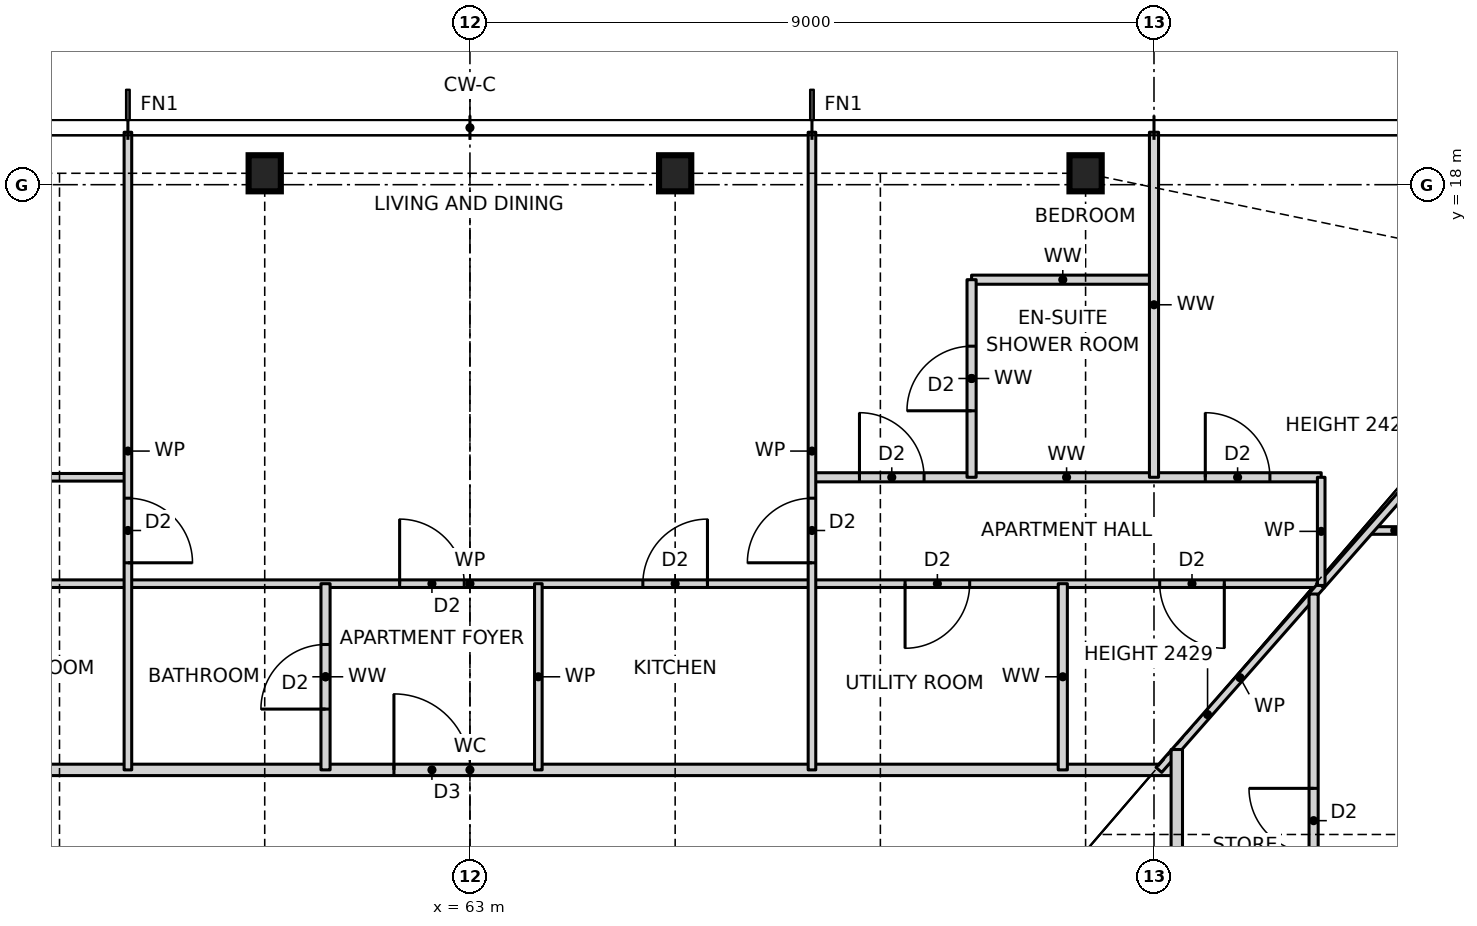
"""IFC4 building model, lengths in metres.
Left out: names, types, materials, properties, quantities, classifications, styles, units other than length and angle.
Written with IfcOpenShell. Run it as: python <this file> out.ifc"""

import sys

from ifc_helpers import new_model, si_unit, direction, frame, frame_2d, origin, origin_2d, place, context, subcontext, project, spatial, rectangle, i_section, extrude, element, fill, save


model = new_model("IFC4")
c1 = context("Model", 3, precision=1e-05, world=origin(), true_north=direction((0.0, 1.0)))
c2 = subcontext(c1, "Body", "Model", "MODEL_VIEW")
j1 = project(units=[si_unit("LENGTHUNIT", "METRE"), si_unit("PLANEANGLEUNIT", "RADIAN")], contexts=[c1])
p1 = place(None, origin())
s1 = spatial("IfcSite", under=j1, at=p1, CompositionType="ELEMENT")
p2 = place(p1, origin())
s2 = spatial("IfcBuilding", under=s1, at=p2, CompositionType="ELEMENT")
p3 = place(p2, frame((0.0, 0.0, 22.0)))
s3 = spatial("IfcBuildingStorey", under=s2, at=p3, CompositionType="ELEMENT", Elevation=22.0)
for number, where, z_axis, x_axis in (
    (1, (71.1, 18.15, 0.0), (0.0, 0.0, 1.0), (1.0, 0.0, 0.0)),
    (2, (65.7, 18.15, 0.0), (0.0, 0.0, 1.0), (1.0, 0.0, 0.0)),
    (3, (60.3, 18.15, 0.0), (0.0, 0.0, 1.0), (1.0, 0.0, 0.0)),
):
    element("IfcColumn", number, at=place(p3, frame(where, z_axis=z_axis, x_axis=x_axis)), inside=s3, PredefinedType="COLUMN", context=c2, shape_type="SweptSolid", body=[
        extrude(i_section(OverallWidth=0.424, OverallDepth=0.475, WebThickness=0.048, FlangeThickness=0.077, at=origin_2d()), origin(), (0.0, 0.0, 1.0), 3.5),
    ])
p4 = place(p3, frame((53.7, 10.3, 0.0), z_axis=(0.0, 0.0, 1.0), x_axis=(1.0, 0.0, 0.0)))
e4 = element("IfcWall", 4, at=p4, inside=s3, PredefinedType="PARTITIONING", context=c2, shape_type="SweptSolid", body=[
    extrude(rectangle(XDim=18.6, YDim=0.15, at=frame_2d((9.3, 0.0))), origin(), (0.0, 0.0, 1.0), 3.27),
])
p5 = place(p4, frame((8.3, 0.0, 0.0)))
e5 = element("IfcOpeningElement", 5, at=p5, cuts=e4, PredefinedType="OPENING", context=c2, shape_type="SweptSolid", body=[
    extrude(rectangle(XDim=1.0, YDim=2.1, at=frame_2d((0.5, 1.05))), frame((0.0, 0.085, 0.0), z_axis=(0.0, -1.0, 0.0), x_axis=(1.0, 0.0, 0.0)), (0.0, 0.0, 1.0), 0.17),
])
p6 = place(p3, frame((51.8, 12.75, 0.0), z_axis=(0.0, 0.0, 1.0), x_axis=(1.0, 0.0, 0.0)))
e6 = element("IfcWall", 6, at=p6, inside=s3, PredefinedType="PARTITIONING", context=c2, shape_type="SweptSolid", body=[
    extrude(rectangle(XDim=22.4, YDim=0.1, at=frame_2d((11.2, 0.0))), origin(), (0.0, 0.0, 1.0), 3.27),
])
p7 = place(p6, frame((13.475, 0.0, 0.0)))
e7 = element("IfcOpeningElement", 7, at=p7, cuts=e6, PredefinedType="OPENING", context=c2, shape_type="SweptSolid", body=[
    extrude(rectangle(XDim=0.85, YDim=2.1, at=frame_2d((0.425, 1.05))), frame((0.0, 0.06, 0.0), z_axis=(0.0, -1.0, 0.0), x_axis=(1.0, 0.0, 0.0)), (0.0, 0.0, 1.0), 0.12),
])
p8 = place(p6, frame((10.275, 0.0, 0.0)))
e8 = element("IfcOpeningElement", 8, at=p8, cuts=e6, PredefinedType="OPENING", context=c2, shape_type="SweptSolid", body=[
    extrude(rectangle(XDim=0.85, YDim=2.1, at=frame_2d((0.425, 1.05))), frame((0.0, 0.06, 0.0), z_axis=(0.0, -1.0, 0.0), x_axis=(1.0, 0.0, 0.0)), (0.0, 0.0, 1.0), 0.12),
])
p9 = place(p6, frame((16.925, 0.0, 0.0)))
e9 = element("IfcOpeningElement", 9, at=p9, cuts=e6, PredefinedType="OPENING", context=c2, shape_type="SweptSolid", body=[
    extrude(rectangle(XDim=0.85, YDim=2.1, at=frame_2d((0.425, 1.05))), frame((0.0, 0.06, 0.0), z_axis=(0.0, -1.0, 0.0), x_axis=(1.0, 0.0, 0.0)), (0.0, 0.0, 1.0), 0.12),
])
p10 = place(p6, frame((20.275, 0.0, 0.0)))
e10 = element("IfcOpeningElement", 10, at=p10, cuts=e6, PredefinedType="OPENING", context=c2, shape_type="SweptSolid", body=[
    extrude(rectangle(XDim=0.85, YDim=2.1, at=frame_2d((0.425, 1.05))), frame((0.0, 0.06, 0.0), z_axis=(0.0, -1.0, 0.0), x_axis=(1.0, 0.0, 0.0)), (0.0, 0.0, 1.0), 0.12),
])
p11 = place(p6, frame((4.625, 0.0, 0.0)))
e11 = element("IfcOpeningElement", 11, at=p11, cuts=e6, PredefinedType="OPENING", context=c2, shape_type="SweptSolid", body=[
    extrude(rectangle(XDim=0.85, YDim=2.1, at=frame_2d((0.425, 1.05))), frame((0.0, 0.06, 0.0), z_axis=(0.0, -1.0, 0.0), x_axis=(1.0, 0.0, 0.0)), (0.0, 0.0, 1.0), 0.12),
])
p12 = place(p6, frame((1.275, 0.0, 0.0)))
e12 = element("IfcOpeningElement", 12, at=p12, cuts=e6, PredefinedType="OPENING", context=c2, shape_type="SweptSolid", body=[
    extrude(rectangle(XDim=0.85, YDim=2.1, at=frame_2d((0.425, 1.05))), frame((0.0, 0.06, 0.0), z_axis=(0.0, -1.0, 0.0), x_axis=(1.0, 0.0, 0.0)), (0.0, 0.0, 1.0), 0.12),
])
p13 = place(p3, frame((74.836, 13.45, 0.0), z_axis=(0.0, 0.0, 1.0), x_axis=(1.0, 0.0, 0.0)))
e13 = element("IfcWall", 13, at=p13, inside=s3, PredefinedType="PARTITIONING", context=c2, shape_type="SweptSolid", body=[
    extrude(rectangle(XDim=0.664, YDim=0.1, at=frame_2d((0.332, 0.0))), origin(), (0.0, 0.0, 1.0), 3.27),
])
p14 = place(p3, frame((51.8, 14.15, 0.0), z_axis=(0.0, 0.0, 1.0), x_axis=(1.0, 0.0, 0.0)))
e14 = element("IfcWall", 14, at=p14, inside=s3, PredefinedType="PARTITIONING", context=c2, shape_type="SweptSolid", body=[
    extrude(rectangle(XDim=6.7, YDim=0.1, at=frame_2d((3.35, 0.0))), origin(), (0.0, 0.0, 1.0), 3.27),
])
p15 = place(p14, frame((4.025, 0.0, 0.0)))
e15 = element("IfcOpeningElement", 15, at=p15, cuts=e14, PredefinedType="OPENING", context=c2, shape_type="SweptSolid", body=[
    extrude(rectangle(XDim=0.85, YDim=2.1, at=frame_2d((0.425, 1.05))), frame((0.0, 0.06, 0.0), z_axis=(0.0, -1.0, 0.0), x_axis=(1.0, 0.0, 0.0)), (0.0, 0.0, 1.0), 0.12),
])
p16 = place(p14, frame((0.675, 0.0, 0.0)))
e16 = element("IfcOpeningElement", 16, at=p16, cuts=e14, PredefinedType="OPENING", context=c2, shape_type="SweptSolid", body=[
    extrude(rectangle(XDim=0.85, YDim=2.1, at=frame_2d((0.425, 1.05))), frame((0.0, 0.06, 0.0), z_axis=(0.0, -1.0, 0.0), x_axis=(1.0, 0.0, 0.0)), (0.0, 0.0, 1.0), 0.12),
])
p17 = place(p3, frame((67.5, 14.15, 0.0), z_axis=(0.0, 0.0, 1.0), x_axis=(1.0, 0.0, 0.0)))
e17 = element("IfcWall", 17, at=p17, inside=s3, PredefinedType="PARTITIONING", context=c2, shape_type="SweptSolid", body=[
    extrude(rectangle(XDim=6.7, YDim=0.12, at=frame_2d((3.35, 0.0))), origin(), (0.0, 0.0, 1.0), 3.27),
])
p18 = place(p17, frame((0.625, 0.0, 0.0)))
e18 = element("IfcOpeningElement", 18, at=p18, cuts=e17, PredefinedType="OPENING", context=c2, shape_type="SweptSolid", body=[
    extrude(rectangle(XDim=0.85, YDim=2.1, at=frame_2d((0.425, 1.05))), frame((0.0, 0.07, 0.0), z_axis=(0.0, -1.0, 0.0), x_axis=(1.0, 0.0, 0.0)), (0.0, 0.0, 1.0), 0.14),
])
p19 = place(p17, frame((5.175, 0.0, 0.0)))
e19 = element("IfcOpeningElement", 19, at=p19, cuts=e17, PredefinedType="OPENING", context=c2, shape_type="SweptSolid", body=[
    extrude(rectangle(XDim=0.85, YDim=2.1, at=frame_2d((0.425, 1.05))), frame((0.0, 0.07, 0.0), z_axis=(0.0, -1.0, 0.0), x_axis=(1.0, 0.0, 0.0)), (0.0, 0.0, 1.0), 0.14),
])
p20 = place(p3, frame((69.6, 16.75, 0.0), z_axis=(0.0, 0.0, 1.0), x_axis=(1.0, 0.0, 0.0)))
e20 = element("IfcWall", 20, at=p20, inside=s3, PredefinedType="PARTITIONING", context=c2, shape_type="SweptSolid", body=[
    extrude(rectangle(XDim=2.4, YDim=0.12, at=frame_2d((1.2, 0.0))), origin(), (0.0, 0.0, 1.0), 3.27),
])
p21 = place(p3, frame((72.064, 10.3, 0.0), z_axis=(0.0, 0.0, 1.0), x_axis=(0.660667046586, 0.75067906162, 0.0)))
e21 = element("IfcWall", 21, at=p21, inside=s3, PredefinedType="PARTITIONING", context=c2, shape_type="SweptSolid", body=[
    extrude(rectangle(XDim=3.233, YDim=0.1, at=frame_2d((1.617, 0.0))), origin(), (0.0, 0.0, 1.0), 2.429),
])
p22 = place(p3, frame((74.2, 12.727, 0.0), z_axis=(0.0, 0.0, 1.0), x_axis=(0.660698595885, 0.750651294141, 0.0)))
e22 = element("IfcWall", 22, at=p22, inside=s3, PredefinedType="PARTITIONING", context=c2, shape_type="SweptSolid", body=[
    extrude(rectangle(XDim=5.838, YDim=0.1, at=frame_2d((2.919, 0.0))), origin(), (0.0, 0.0, 1.0), 2.429),
])
p23 = place(p3, frame((74.2, 12.727, 0.0), z_axis=(0.0, 0.0, 1.0), x_axis=(0.0, 1.0, 0.0)))
e23 = element("IfcWall", 23, at=p23, inside=s3, PredefinedType="PARTITIONING", context=c2, shape_type="SweptSolid", body=[
    extrude(rectangle(XDim=1.423, YDim=0.1, at=frame_2d((0.711, 0.0))), origin(), (0.0, 0.0, 1.0), 3.27),
])
p24 = place(p3, frame((74.1, -12.614, 0.0), z_axis=(0.0, 0.0, 1.0), x_axis=(0.0, 1.0, 0.0)))
e24 = element("IfcWall", 24, at=p24, inside=s3, PredefinedType="PARTITIONING", context=c2, shape_type="SweptSolid", body=[
    extrude(rectangle(XDim=25.228, YDim=0.12, at=frame_2d((12.614, 0.0))), origin(), (0.0, 0.0, 1.0), 3.27),
])
p25 = place(p24, frame((7.239, 0.0, 0.0)))
e25 = element("IfcOpeningElement", 25, at=p25, cuts=e24, PredefinedType="OPENING", context=c2, shape_type="SweptSolid", body=[
    extrude(rectangle(XDim=0.85, YDim=2.1, at=frame_2d((0.425, 1.05))), frame((0.0, 0.07, 0.0), z_axis=(0.0, -1.0, 0.0), x_axis=(1.0, 0.0, 0.0)), (0.0, 0.0, 1.0), 0.14),
])
p26 = place(p24, frame((10.439, 0.0, 0.0)))
e26 = element("IfcOpeningElement", 26, at=p26, cuts=e24, PredefinedType="OPENING", context=c2, shape_type="SweptSolid", body=[
    extrude(rectangle(XDim=0.85, YDim=2.1, at=frame_2d((0.425, 1.05))), frame((0.0, 0.07, 0.0), z_axis=(0.0, -1.0, 0.0), x_axis=(1.0, 0.0, 0.0)), (0.0, 0.0, 1.0), 0.14),
])
p27 = place(p24, frame((2.507, 0.0, 0.0)))
e27 = element("IfcOpeningElement", 27, at=p27, cuts=e24, PredefinedType="OPENING", context=c2, shape_type="SweptSolid", body=[
    extrude(rectangle(XDim=0.85, YDim=2.1, at=frame_2d((0.425, 1.05))), frame((0.0, 0.07, 0.0), z_axis=(0.0, -1.0, 0.0), x_axis=(1.0, 0.0, 0.0)), (0.0, 0.0, 1.0), 0.14),
])
p28 = place(p24, frame((16.639, 0.0, 0.0)))
e28 = element("IfcOpeningElement", 28, at=p28, cuts=e24, PredefinedType="OPENING", context=c2, shape_type="SweptSolid", body=[
    extrude(rectangle(XDim=0.85, YDim=2.1, at=frame_2d((0.425, 1.05))), frame((0.0, 0.07, 0.0), z_axis=(0.0, -1.0, 0.0), x_axis=(1.0, 0.0, 0.0)), (0.0, 0.0, 1.0), 0.14),
])
p29 = place(p24, frame((21.821, 0.0, 0.0)))
e29 = element("IfcOpeningElement", 29, at=p29, cuts=e24, PredefinedType="OPENING", context=c2, shape_type="SweptSolid", body=[
    extrude(rectangle(XDim=0.85, YDim=2.1, at=frame_2d((0.425, 1.05))), frame((0.0, 0.07, 0.0), z_axis=(0.0, -1.0, 0.0), x_axis=(1.0, 0.0, 0.0)), (0.0, 0.0, 1.0), 0.14),
])
p30 = place(p3, frame((72.3, -10.9, 0.0), z_axis=(0.0, 0.0, 1.0), x_axis=(0.0, 1.0, 0.0)))
e30 = element("IfcWall", 30, at=p30, inside=s3, PredefinedType="PARTITIONING", context=c2, shape_type="SweptSolid", body=[
    extrude(rectangle(XDim=21.468, YDim=0.15, at=frame_2d((10.734, 0.0))), origin(), (0.0, 0.0, 1.0), 3.27),
])
p31 = place(p30, frame((8.65, 0.0, 0.0)))
e31 = element("IfcOpeningElement", 31, at=p31, cuts=e30, PredefinedType="OPENING", context=c2, shape_type="SweptSolid", body=[
    extrude(rectangle(XDim=1.0, YDim=2.1, at=frame_2d((0.5, 1.05))), frame((0.0, 0.085, 0.0), z_axis=(0.0, -1.0, 0.0), x_axis=(1.0, 0.0, 0.0)), (0.0, 0.0, 1.0), 0.17),
])
p32 = place(p3, frame((72.0, 14.15, 0.0), z_axis=(0.0, 0.0, 1.0), x_axis=(0.0, 1.0, 0.0)))
e32 = element("IfcWall", 32, at=p32, inside=s3, PredefinedType="PARTITIONING", context=c2, shape_type="SweptSolid", body=[
    extrude(rectangle(XDim=4.54, YDim=0.12, at=frame_2d((2.27, 0.0))), origin(), (0.0, 0.0, 1.0), 3.27),
])
p33 = place(p3, frame((70.8, 10.3, 0.0), z_axis=(0.0, 0.0, 1.0), x_axis=(0.0, 1.0, 0.0)))
e33 = element("IfcWall", 33, at=p33, inside=s3, PredefinedType="PARTITIONING", context=c2, shape_type="SweptSolid", body=[
    extrude(rectangle(XDim=2.45, YDim=0.12, at=frame_2d((1.225, 0.0))), origin(), (0.0, 0.0, 1.0), 3.27),
])
p34 = place(p3, frame((69.6, 14.15, 0.0), z_axis=(0.0, 0.0, 1.0), x_axis=(0.0, 1.0, 0.0)))
e34 = element("IfcWall", 34, at=p34, inside=s3, PredefinedType="PARTITIONING", context=c2, shape_type="SweptSolid", body=[
    extrude(rectangle(XDim=2.6, YDim=0.12, at=frame_2d((1.3, 0.0))), origin(), (0.0, 0.0, 1.0), 3.27),
])
p35 = place(p34, frame((0.875, 0.0, 0.0)))
e35 = element("IfcOpeningElement", 35, at=p35, cuts=e34, PredefinedType="OPENING", context=c2, shape_type="SweptSolid", body=[
    extrude(rectangle(XDim=0.85, YDim=2.1, at=frame_2d((0.425, 1.05))), frame((0.0, 0.07, 0.0), z_axis=(0.0, -1.0, 0.0), x_axis=(1.0, 0.0, 0.0)), (0.0, 0.0, 1.0), 0.14),
])
p36 = place(p3, frame((67.5, 10.3, 0.0), z_axis=(0.0, 0.0, 1.0), x_axis=(0.0, 1.0, 0.0)))
e36 = element("IfcWall", 36, at=p36, inside=s3, PredefinedType="PARTITIONING", context=c2, shape_type="SweptSolid", body=[
    extrude(rectangle(XDim=8.39, YDim=0.1, at=frame_2d((4.195, 0.0))), origin(), (0.0, 0.0, 1.0), 3.27),
])
p37 = place(p36, frame((2.725, 0.0, 0.0)))
e37 = element("IfcOpeningElement", 37, at=p37, cuts=e36, PredefinedType="OPENING", context=c2, shape_type="SweptSolid", body=[
    extrude(rectangle(XDim=0.85, YDim=2.1, at=frame_2d((0.425, 1.05))), frame((0.0, 0.06, 0.0), z_axis=(0.0, -1.0, 0.0), x_axis=(1.0, 0.0, 0.0)), (0.0, 0.0, 1.0), 0.12),
])
p38 = place(p3, frame((63.9, 10.3, 0.0), z_axis=(0.0, 0.0, 1.0), x_axis=(0.0, 1.0, 0.0)))
e38 = element("IfcWall", 38, at=p38, inside=s3, PredefinedType="PARTITIONING", context=c2, shape_type="SweptSolid", body=[
    extrude(rectangle(XDim=2.45, YDim=0.1, at=frame_2d((1.225, 0.0))), origin(), (0.0, 0.0, 1.0), 3.27),
])
p39 = place(p3, frame((61.1, 10.3, 0.0), z_axis=(0.0, 0.0, 1.0), x_axis=(0.0, 1.0, 0.0)))
e39 = element("IfcWall", 39, at=p39, inside=s3, PredefinedType="PARTITIONING", context=c2, shape_type="SweptSolid", body=[
    extrude(rectangle(XDim=2.45, YDim=0.12, at=frame_2d((1.225, 0.0))), origin(), (0.0, 0.0, 1.0), 3.27),
])
p40 = place(p39, frame((0.8, 0.0, 0.0)))
e40 = element("IfcOpeningElement", 40, at=p40, cuts=e39, PredefinedType="OPENING", context=c2, shape_type="SweptSolid", body=[
    extrude(rectangle(XDim=0.85, YDim=2.1, at=frame_2d((0.425, 1.05))), frame((0.0, 0.07, 0.0), z_axis=(0.0, -1.0, 0.0), x_axis=(1.0, 0.0, 0.0)), (0.0, 0.0, 1.0), 0.14),
])
p41 = place(p3, frame((58.5, 10.3, 0.0), z_axis=(0.0, 0.0, 1.0), x_axis=(0.0, 1.0, 0.0)))
e41 = element("IfcWall", 41, at=p41, inside=s3, PredefinedType="PARTITIONING", context=c2, shape_type="SweptSolid", body=[
    extrude(rectangle(XDim=8.39, YDim=0.1, at=frame_2d((4.195, 0.0))), origin(), (0.0, 0.0, 1.0), 3.27),
])
p42 = place(p41, frame((2.725, 0.0, 0.0)))
e42 = element("IfcOpeningElement", 42, at=p42, cuts=e41, PredefinedType="OPENING", context=c2, shape_type="SweptSolid", body=[
    extrude(rectangle(XDim=0.85, YDim=2.1, at=frame_2d((0.425, 1.05))), frame((0.0, 0.06, 0.0), z_axis=(0.0, -1.0, 0.0), x_axis=(1.0, 0.0, 0.0)), (0.0, 0.0, 1.0), 0.12),
])
p43 = place(p29, origin())
e43 = element("IfcDoor", 43, at=p43, inside=s3, OperationType="SINGLE_SWING_RIGHT", PredefinedType="DOOR", context=c2, shape_type="SweptSolid", body=[
    extrude(rectangle(XDim=0.85, YDim=2.1, at=frame_2d((0.425, 1.05))), frame((0.0, 0.025, 0.0), z_axis=(0.0, -1.0, 0.0), x_axis=(1.0, 0.0, 0.0)), (0.0, 0.0, 1.0), 0.05),
])
fill(e29, e43)
p44 = place(p7, origin())
e44 = element("IfcDoor", 44, at=p44, inside=s3, OperationType="SINGLE_SWING_RIGHT", PredefinedType="DOOR", context=c2, shape_type="SweptSolid", body=[
    extrude(rectangle(XDim=0.85, YDim=2.1, at=frame_2d((0.425, 1.05))), frame((0.0, 0.025, 0.0), z_axis=(0.0, -1.0, 0.0), x_axis=(1.0, 0.0, 0.0)), (0.0, 0.0, 1.0), 0.05),
])
fill(e7, e44)
p45 = place(p5, origin())
e45 = element("IfcDoor", 45, at=p45, inside=s3, OperationType="SINGLE_SWING_LEFT", PredefinedType="DOOR", context=c2, shape_type="SweptSolid", body=[
    extrude(rectangle(XDim=1.0, YDim=2.1, at=frame_2d((0.5, 1.05))), frame((0.0, 0.025, 0.0), z_axis=(0.0, -1.0, 0.0), x_axis=(1.0, 0.0, 0.0)), (0.0, 0.0, 1.0), 0.05),
])
fill(e5, e45)
p46 = place(p8, origin())
e46 = element("IfcDoor", 46, at=p46, inside=s3, OperationType="SINGLE_SWING_LEFT", PredefinedType="DOOR", context=c2, shape_type="SweptSolid", body=[
    extrude(rectangle(XDim=0.85, YDim=2.1, at=frame_2d((0.425, 1.05))), frame((0.0, 0.025, 0.0), z_axis=(0.0, -1.0, 0.0), x_axis=(1.0, 0.0, 0.0)), (0.0, 0.0, 1.0), 0.05),
])
fill(e8, e46)
p47 = place(p40, origin())
e47 = element("IfcDoor", 47, at=p47, inside=s3, OperationType="SINGLE_SWING_LEFT", PredefinedType="DOOR", context=c2, shape_type="SweptSolid", body=[
    extrude(rectangle(XDim=0.85, YDim=2.1, at=frame_2d((0.425, 1.05))), frame((0.0, 0.025, 0.0), z_axis=(0.0, -1.0, 0.0), x_axis=(1.0, 0.0, 0.0)), (0.0, 0.0, 1.0), 0.05),
])
fill(e40, e47)
p48 = place(p37, origin())
e48 = element("IfcDoor", 48, at=p48, inside=s3, OperationType="SINGLE_SWING_LEFT", PredefinedType="DOOR", context=c2, shape_type="SweptSolid", body=[
    extrude(rectangle(XDim=0.85, YDim=2.1, at=frame_2d((0.425, 1.05))), frame((0.0, 0.025, 0.0), z_axis=(0.0, -1.0, 0.0), x_axis=(1.0, 0.0, 0.0)), (0.0, 0.0, 1.0), 0.05),
])
fill(e37, e48)
p49 = place(p35, origin())
e49 = element("IfcDoor", 49, at=p49, inside=s3, OperationType="SINGLE_SWING_LEFT", PredefinedType="DOOR", context=c2, shape_type="SweptSolid", body=[
    extrude(rectangle(XDim=0.85, YDim=2.1, at=frame_2d((0.425, 1.05))), frame((0.0, 0.025, 0.0), z_axis=(0.0, -1.0, 0.0), x_axis=(1.0, 0.0, 0.0)), (0.0, 0.0, 1.0), 0.05),
])
fill(e35, e49)
p50 = place(p18, origin())
e50 = element("IfcDoor", 50, at=p50, inside=s3, OperationType="SINGLE_SWING_LEFT", PredefinedType="DOOR", context=c2, shape_type="SweptSolid", body=[
    extrude(rectangle(XDim=0.85, YDim=2.1, at=frame_2d((0.425, 1.05))), frame((0.0, 0.025, 0.0), z_axis=(0.0, -1.0, 0.0), x_axis=(1.0, 0.0, 0.0)), (0.0, 0.0, 1.0), 0.05),
])
fill(e18, e50)
p51 = place(p19, origin())
e51 = element("IfcDoor", 51, at=p51, inside=s3, OperationType="SINGLE_SWING_LEFT", PredefinedType="DOOR", context=c2, shape_type="SweptSolid", body=[
    extrude(rectangle(XDim=0.85, YDim=2.1, at=frame_2d((0.425, 1.05))), frame((0.0, 0.025, 0.0), z_axis=(0.0, -1.0, 0.0), x_axis=(1.0, 0.0, 0.0)), (0.0, 0.0, 1.0), 0.05),
])
fill(e19, e51)
p52 = place(p9, frame((0.85, 0.0, 0.0), z_axis=(0.0, 0.0, 1.0), x_axis=(-1.0, 0.0, 0.0)))
e52 = element("IfcDoor", 52, at=p52, inside=s3, OperationType="SINGLE_SWING_RIGHT", PredefinedType="DOOR", context=c2, shape_type="SweptSolid", body=[
    extrude(rectangle(XDim=0.85, YDim=2.1, at=frame_2d((0.425, 1.05))), frame((0.0, 0.025, 0.0), z_axis=(0.0, -1.0, 0.0), x_axis=(1.0, 0.0, 0.0)), (0.0, 0.0, 1.0), 0.05),
])
fill(e9, e52)
p53 = place(p10, frame((0.85, 0.0, 0.0), z_axis=(0.0, 0.0, 1.0), x_axis=(-1.0, 0.0, 0.0)))
e53 = element("IfcDoor", 53, at=p53, inside=s3, OperationType="SINGLE_SWING_LEFT", PredefinedType="DOOR", context=c2, shape_type="SweptSolid", body=[
    extrude(rectangle(XDim=0.85, YDim=2.1, at=frame_2d((0.425, 1.05))), frame((0.0, 0.025, 0.0), z_axis=(0.0, -1.0, 0.0), x_axis=(1.0, 0.0, 0.0)), (0.0, 0.0, 1.0), 0.05),
])
fill(e10, e53)
p54 = place(p42, frame((0.85, 0.0, 0.0), z_axis=(0.0, 0.0, 1.0), x_axis=(-1.0, 0.0, 0.0)))
e54 = element("IfcDoor", 54, at=p54, inside=s3, OperationType="SINGLE_SWING_RIGHT", PredefinedType="DOOR", context=c2, shape_type="SweptSolid", body=[
    extrude(rectangle(XDim=0.85, YDim=2.1, at=frame_2d((0.425, 1.05))), frame((0.0, 0.025, 0.0), z_axis=(0.0, -1.0, 0.0), x_axis=(1.0, 0.0, 0.0)), (0.0, 0.0, 1.0), 0.05),
])
fill(e42, e54)
save(model, sys.argv[1])
